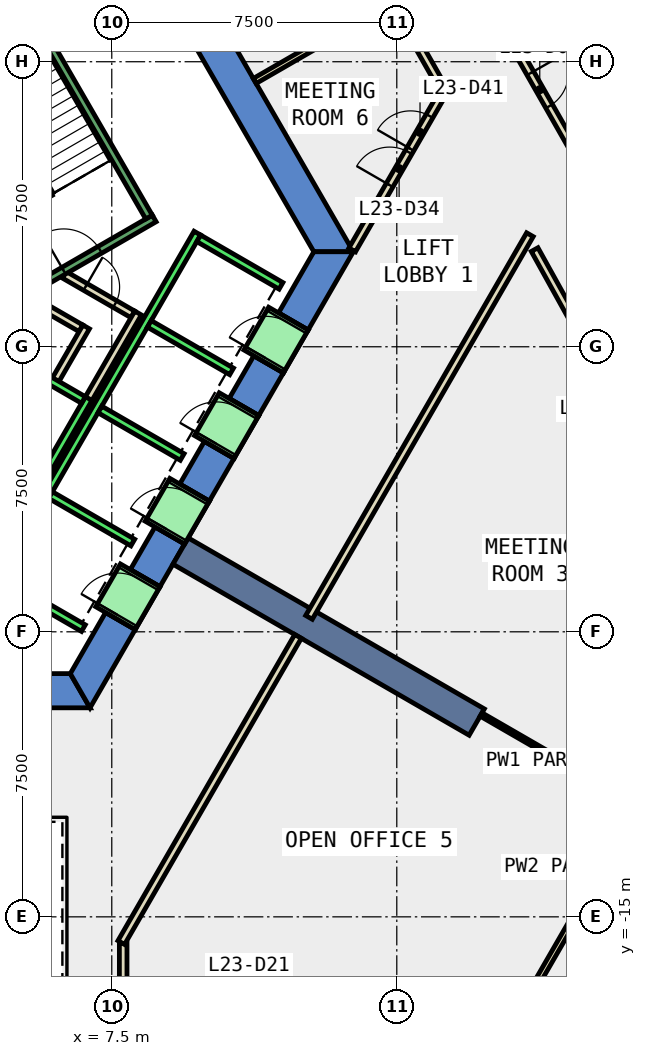
"""IFC4 building model, lengths in metres.
Left out: names, types, materials, properties, quantities, classifications, styles, units other than length and angle.
Written with IfcOpenShell. Run it as: python <this file> out.ifc"""

import sys

from ifc_helpers import new_model, si_unit, direction, frame, frame_2d, origin, place, context, subcontext, project, spatial, polyline, rectangle, outline, extrude, element, fill, save


model = new_model("IFC4")
c1 = context("Model", 3, precision=1e-05, world=origin(), true_north=direction((0.0, 1.0)))
c2 = subcontext(c1, "Body", "Model", "MODEL_VIEW")
j1 = project(units=[si_unit("LENGTHUNIT", "METRE"), si_unit("PLANEANGLEUNIT", "RADIAN")], contexts=[c1])
p1 = place(None, origin())
s1 = spatial("IfcSite", under=j1, at=p1, CompositionType="ELEMENT")
p2 = place(p1, origin())
s2 = spatial("IfcBuilding", under=s1, at=p2, CompositionType="ELEMENT")
p3 = place(p2, frame((0.0, 0.0, 107.6)))
s3 = spatial("IfcBuildingStorey", under=s2, at=p3, CompositionType="ELEMENT", Elevation=107.6)
p4 = place(p3, frame((0.0, 0.0, -0.4)))
e1 = element("IfcWall", 1, at=p4, inside=s3, PredefinedType="SHEAR", context=c2, shape_type="SweptSolid", body=[
    extrude(outline(polyline([(8.517, 11.748), (7.738, 11.298), (12.817, 2.5), (13.856, 2.5), (8.517, 11.748)])), origin(), (0.0, 0.0, 1.0), 4.2),
])
p5 = place(p3, frame((0.0, 0.0, -0.4)))
e2 = element("IfcWall", 2, at=p5, inside=s3, PredefinedType="SHEAR", context=c2, shape_type="SweptSolid", body=[
    extrude(outline(polyline([(5.75, -8.6), (5.75, -9.5), (6.928, -9.5), (6.409, -8.6), (5.75, -8.6)])), origin(), (0.0, 0.0, 1.0), 4.2),
])
p6 = place(p3, frame((0.0, 0.0, -0.4)))
e3 = element("IfcWall", 3, at=p6, inside=s3, PredefinedType="SHEAR", context=c2, shape_type="SweptSolid", body=[
    extrude(outline(polyline([(8.117, -7.44), (7.338, -6.99), (6.409, -8.6), (6.928, -9.5), (8.117, -7.44)])), origin(), (0.0, 0.0, 1.0), 4.2),
])
p7 = place(p3, frame((0.0, 0.0, -0.4)))
e4 = element("IfcWall", 4, at=p7, inside=s3, PredefinedType="SHEAR", context=c2, shape_type="SweptSolid", body=[
    extrude(outline(polyline([(9.417, -5.189), (8.638, -4.739), (7.988, -5.864), (8.767, -6.314), (9.417, -5.189)])), origin(), (0.0, 0.0, 1.0), 4.2),
])
p8 = place(p3, frame((0.0, 0.0, -0.4)))
e5 = element("IfcWall", 5, at=p8, inside=s3, PredefinedType="SHEAR", context=c2, shape_type="SweptSolid", body=[
    extrude(outline(polyline([(10.717, -2.937), (9.938, -2.487), (9.288, -3.613), (10.067, -4.063), (10.717, -2.937)])), origin(), (0.0, 0.0, 1.0), 4.2),
])
p9 = place(p3, frame((0.0, 0.0, -0.4)))
e6 = element("IfcWall", 6, at=p9, inside=s3, PredefinedType="SHEAR", context=c2, shape_type="SweptSolid", body=[
    extrude(outline(polyline([(12.017, -0.686), (11.238, -0.236), (10.588, -1.361), (11.367, -1.811), (12.017, -0.686)])), origin(), (0.0, 0.0, 1.0), 4.2),
])
p10 = place(p3, frame((0.0, 0.0, -0.4)))
e7 = element("IfcWall", 7, at=p10, inside=s3, PredefinedType="SHEAR", context=c2, shape_type="SweptSolid", body=[
    extrude(outline(polyline([(11.888, 0.89), (12.667, 0.44), (13.856, 2.5), (12.817, 2.5), (11.888, 0.89)])), origin(), (0.0, 0.0, 1.0), 4.2),
])
p11 = place(p3, frame((0.0, 0.0, 3.6)))
e8 = element("IfcWall", 8, at=p11, inside=s3, PredefinedType="SHEAR", context=c2, shape_type="SweptSolid", body=[
    extrude(outline(polyline([(8.767, -6.314), (7.988, -5.864), (7.338, -6.99), (8.117, -7.44), (8.767, -6.314)])), origin(), (0.0, 0.0, 1.0), 0.2),
])
p12 = place(p3, frame((0.0, 0.0, 3.6)))
e9 = element("IfcWall", 9, at=p12, inside=s3, PredefinedType="SHEAR", context=c2, shape_type="SweptSolid", body=[
    extrude(outline(polyline([(10.067, -4.063), (9.288, -3.613), (8.638, -4.739), (9.417, -5.189), (10.067, -4.063)])), origin(), (0.0, 0.0, 1.0), 0.2),
])
p13 = place(p3, frame((0.0, 0.0, 3.6)))
e10 = element("IfcWall", 10, at=p13, inside=s3, PredefinedType="SHEAR", context=c2, shape_type="SweptSolid", body=[
    extrude(outline(polyline([(11.367, -1.811), (10.588, -1.361), (9.938, -2.487), (10.717, -2.937), (11.367, -1.811)])), origin(), (0.0, 0.0, 1.0), 0.2),
])
p14 = place(p3, frame((0.0, 0.0, 3.6)))
e11 = element("IfcWall", 11, at=p14, inside=s3, PredefinedType="SHEAR", context=c2, shape_type="SweptSolid", body=[
    extrude(outline(polyline([(12.667, 0.44), (11.888, 0.89), (11.238, -0.236), (12.017, -0.686), (12.667, 0.44)])), origin(), (0.0, 0.0, 1.0), 0.2),
])
p15 = place(p3, frame((9.31, -5.375, -0.4), z_axis=(0.0, 0.0, 1.0), x_axis=(0.866017533419, -0.500013631625, 0.0)))
e12 = element("IfcWall", 12, at=p15, inside=s3, PredefinedType="SHEAR", context=c2, shape_type="SweptSolid", body=[
    extrude(rectangle(XDim=9.0, YDim=0.8, at=frame_2d((4.5, 0.0))), origin(), (0.0, 0.0, 1.0), 4.2),
])
p16 = place(p3, frame((16.195, 6.824, 0.0), z_axis=(0.0, 0.0, 1.0), x_axis=(-0.494984897559, 0.868901577388, 0.0)))
e13 = element("IfcWall", 13, at=p16, inside=s3, PredefinedType="PARTITIONING", context=c2, shape_type="SweptSolid", body=[
    extrude(rectangle(XDim=2.188, YDim=0.2, at=frame_2d((1.094, 0.0))), origin(), (0.0, 0.0, 1.0), 3.8),
])
p17 = place(p3, frame((22.071, -3.65, 0.0), z_axis=(0.0, 0.0, 1.0), x_axis=(-0.485198988697, 0.874403763354, 0.0)))
e14 = element("IfcWall", 14, at=p17, inside=s3, PredefinedType="PARTITIONING", context=c2, shape_type="SweptSolid", body=[
    extrude(rectangle(XDim=7.098, YDim=0.2, at=frame_2d((3.549, 0.0))), origin(), (0.0, 0.0, 1.0), 3.8),
])
p18 = place(p17, frame((3.049, 0.0, 0.0)))
e15 = element("IfcOpeningElement", 15, at=p18, cuts=e14, PredefinedType="OPENING", context=c2, shape_type="SweptSolid", body=[
    extrude(rectangle(XDim=1.0, YDim=2.1, at=frame_2d((0.5, 1.05))), frame((0.0, 0.11, 0.0), z_axis=(0.0, -1.0, 0.0), x_axis=(1.0, 0.0, 0.0)), (0.0, 0.0, 1.0), 0.22),
])
p19 = place(p3, frame((16.98, 9.89, 0.0), z_axis=(0.0, 0.0, 1.0), x_axis=(0.495123170501, -0.868822793228, 0.0)))
e16 = element("IfcWall", 16, at=p19, inside=s3, PredefinedType="PARTITIONING", context=c2, shape_type="SweptSolid", body=[
    extrude(rectangle(XDim=7.198, YDim=0.2, at=frame_2d((3.599, 0.0))), origin(), (0.0, 0.0, 1.0), 3.8),
])
p20 = place(p19, frame((3.099, 0.0, 0.0)))
e17 = element("IfcOpeningElement", 17, at=p20, cuts=e16, PredefinedType="OPENING", context=c2, shape_type="SweptSolid", body=[
    extrude(rectangle(XDim=1.0, YDim=2.1, at=frame_2d((0.5, 1.05))), frame((0.0, 0.11, 0.0), z_axis=(0.0, -1.0, 0.0), x_axis=(1.0, 0.0, 0.0)), (0.0, 0.0, 1.0), 0.22),
])
p21 = place(p3, frame((5.499, 1.172, 0.0), z_axis=(0.0, 0.0, 1.0), x_axis=(0.866333505267, -0.499465972466, 0.0)))
e18 = element("IfcWall", 18, at=p21, inside=s3, PredefinedType="PARTITIONING", context=c2, shape_type="SweptSolid", body=[
    extrude(rectangle(XDim=1.374, YDim=0.2, at=frame_2d((0.687, 0.0))), origin(), (0.0, 0.0, 1.0), 3.8),
])
p22 = place(p3, frame((6.826, 0.522, 0.0), z_axis=(0.0, 0.0, 1.0), x_axis=(-0.500016722714, -0.866015748706, 0.0)))
e19 = element("IfcWall", 19, at=p22, inside=s3, PredefinedType="PARTITIONING", context=c2, shape_type="SweptSolid", body=[
    extrude(rectangle(XDim=1.7, YDim=0.2, at=frame_2d((0.85, 0.0))), origin(), (0.0, 0.0, 1.0), 3.8),
])
p23 = place(p3, frame((6.25, 1.894, 0.0), z_axis=(0.0, 0.0, 1.0), x_axis=(0.866043184279, -0.499969202016, 0.0)))
e20 = element("IfcWall", 20, at=p23, inside=s3, PredefinedType="PARTITIONING", context=c2, shape_type="SweptSolid", body=[
    extrude(rectangle(XDim=2.084, YDim=0.2, at=frame_2d((1.042, 0.0))), origin(), (0.0, 0.0, 1.0), 3.8),
])
p24 = place(p23, frame((0.642, 0.0, 0.0)))
e21 = element("IfcOpeningElement", 21, at=p24, cuts=e20, PredefinedType="OPENING", context=c2, shape_type="SweptSolid", body=[
    extrude(rectangle(XDim=0.9, YDim=2.1, at=frame_2d((0.45, 1.05))), frame((0.0, 0.11, 0.0), z_axis=(0.0, -1.0, 0.0), x_axis=(1.0, 0.0, 0.0)), (0.0, 0.0, 1.0), 0.22),
])
p25 = place(p3, frame((8.192, 0.888, 0.0), z_axis=(0.0, 0.0, 1.0), x_axis=(-0.499940625693, -0.866059680843, 0.0)))
e22 = element("IfcWall", 22, at=p25, inside=s3, PredefinedType="PARTITIONING", context=c2, shape_type="SweptSolid", body=[
    extrude(rectangle(XDim=2.68, YDim=0.2, at=frame_2d((1.34, 0.0))), origin(), (0.0, 0.0, 1.0), 3.8),
])
p26 = place(p3, frame((11.261, 6.994, 0.0), z_axis=(0.0, 0.0, 1.0), x_axis=(0.866037428454, 0.499979172084, 0.0)))
e23 = element("IfcWall", 23, at=p26, inside=s3, PredefinedType="PARTITIONING", context=c2, shape_type="SweptSolid", body=[
    extrude(rectangle(XDim=4.198, YDim=0.15, at=frame_2d((2.099, 0.0))), origin(), (0.0, 0.0, 1.0), 3.8),
])
p27 = place(p3, frame((13.827, 2.55, 0.0), z_axis=(0.0, 0.0, 1.0), x_axis=(0.500070719615, 0.865984569946, 0.0)))
e24 = element("IfcWall", 24, at=p27, inside=s3, PredefinedType="PARTITIONING", context=c2, shape_type="SweptSolid", body=[
    extrude(rectangle(XDim=4.935, YDim=0.2, at=frame_2d((2.468, 0.0))), origin(), (0.0, 0.0, 1.0), 3.8),
])
p28 = place(p27, frame((1.968, 0.0, 0.0)))
e25 = element("IfcOpeningElement", 25, at=p28, cuts=e24, PredefinedType="OPENING", context=c2, shape_type="SweptSolid", body=[
    extrude(rectangle(XDim=1.0, YDim=2.1, at=frame_2d((0.5, 1.05))), frame((0.0, 0.11, 0.0), z_axis=(0.0, -1.0, 0.0), x_axis=(1.0, 0.0, 0.0)), (0.0, 0.0, 1.0), 0.22),
])
p29 = place(p27, frame((3.068, 0.0, 0.0)))
e26 = element("IfcOpeningElement", 26, at=p29, cuts=e24, PredefinedType="OPENING", context=c2, shape_type="SweptSolid", body=[
    extrude(rectangle(XDim=1.0, YDim=2.1, at=frame_2d((0.5, 1.05))), frame((0.0, 0.11, 0.0), z_axis=(0.0, -1.0, 0.0), x_axis=(1.0, 0.0, 0.0)), (0.0, 0.0, 1.0), 0.22),
])
p30 = place(p3, frame((7.8, -15.69, 0.0), z_axis=(0.0, 0.0, 1.0), x_axis=(0.0, -1.0, 0.0)))
e27 = element("IfcWall", 27, at=p30, inside=s3, PredefinedType="PARTITIONING", context=c2, shape_type="SweptSolid", body=[
    extrude(rectangle(XDim=1.7, YDim=0.2, at=frame_2d((0.85, 0.0))), origin(), (0.0, 0.0, 1.0), 3.8),
])
p31 = place(p3, frame((12.401, -7.621, 0.0), z_axis=(0.0, 0.0, 1.0), x_axis=(-0.499983724212, -0.866034800411, 0.0)))
e28 = element("IfcWall", 28, at=p31, inside=s3, PredefinedType="PARTITIONING", context=c2, shape_type="SweptSolid", body=[
    extrude(rectangle(XDim=9.302, YDim=0.2, at=frame_2d((4.651, 0.0))), origin(), (0.0, 0.0, 1.0), 3.8),
])
p32 = place(p3, frame((18.503, 2.949, 0.0), z_axis=(0.0, 0.0, 1.0), x_axis=(-0.49997390151, -0.86604047123, 0.0)))
e29 = element("IfcWall", 29, at=p32, inside=s3, PredefinedType="PARTITIONING", context=c2, shape_type="SweptSolid", body=[
    extrude(rectangle(XDim=11.626, YDim=0.2, at=frame_2d((5.813, 0.0))), origin(), (0.0, 0.0, 1.0), 3.8),
])
p33 = place(p3, frame((17.219, -9.676, 0.0), z_axis=(0.0, 0.0, 1.0), x_axis=(0.86598459596, -0.500070674565, 0.0)))
e30 = element("IfcWall", 30, at=p33, inside=s3, PredefinedType="PARTITIONING", context=c2, shape_type="SweptSolid", body=[
    extrude(rectangle(XDim=4.875, YDim=0.1, at=frame_2d((2.438, 0.0))), origin(), (0.0, 0.0, 1.0), 3.8),
])
p34 = place(p3, frame((21.236, -12.319, 0.0), z_axis=(0.0, 0.0, 1.0), x_axis=(-0.500016488359, -0.866015884017, 0.0)))
e31 = element("IfcWall", 31, at=p34, inside=s3, PredefinedType="PARTITIONING", context=c2, shape_type="SweptSolid", body=[
    extrude(rectangle(XDim=5.702, YDim=0.15, at=frame_2d((2.851, 0.0))), origin(), (0.0, 0.0, 1.0), 3.8),
])
p35 = place(p3, frame((5.492, -3.788, 0.0), z_axis=(0.0, 0.0, 1.0), x_axis=(0.500011755427, 0.866018616679, 0.0)))
e32 = element("IfcWall", 32, at=p35, inside=s3, PredefinedType="STANDARD", context=c2, shape_type="SweptSolid", body=[
    extrude(rectangle(XDim=2.8, YDim=0.2, at=frame_2d((1.4, 0.0))), origin(), (0.0, 0.0, 1.0), 3.8),
])
p36 = place(p3, frame((4.677, -0.2, 0.0), z_axis=(0.0, 0.0, 1.0), x_axis=(0.865973769406, -0.500089422704, 0.0)))
e33 = element("IfcWall", 33, at=p36, inside=s3, PredefinedType="STANDARD", context=c2, shape_type="SweptSolid", body=[
    extrude(rectangle(XDim=2.399, YDim=0.2, at=frame_2d((1.2, 0.0))), origin(), (0.0, 0.0, 1.0), 3.8),
])
p37 = place(p3, frame((4.451, -6.19, 0.0), z_axis=(0.0, 0.0, 1.0), x_axis=(0.50000090737, 0.866024879913, 0.0)))
e34 = element("IfcWall", 34, at=p37, inside=s3, PredefinedType="STANDARD", context=c2, shape_type="SweptSolid", body=[
    extrude(rectangle(XDim=10.6, YDim=0.2, at=frame_2d((5.3, 0.0))), origin(), (0.0, 0.0, 1.0), 3.8),
])
for number, where, z_axis, x_axis in (
    (35, (4.588, -6.153, 0.0), (0.0, 0.0, 1.0), (0.866, -0.5, 0.0)),
    (36, (5.888, -3.902, 0.0), (0.0, 0.0, 1.0), (0.866, -0.5, 0.0)),
    (37, (7.188, -1.65, 0.0), (0.0, 0.0, 1.0), (0.866, -0.5, 0.0)),
    (38, (8.488, 0.602, 0.0), (0.0, 0.0, 1.0), (0.866, -0.5, 0.0)),
):
    element("IfcWall", number, at=place(p3, frame(where, z_axis=z_axis, x_axis=x_axis)), inside=s3, PredefinedType="STANDARD", context=c2, shape_type="SweptSolid", body=[
        extrude(rectangle(XDim=2.5, YDim=0.2, at=frame_2d((1.25, 0.0))), origin(), (0.0, 0.0, 1.0), 3.8),
    ])
p38 = place(p3, frame((9.788, 2.853, 0.0), z_axis=(0.0, 0.0, 1.0), x_axis=(0.865998541277, -0.500046524342, 0.0)))
e39 = element("IfcWall", 39, at=p38, inside=s3, PredefinedType="STANDARD", context=c2, shape_type="SweptSolid", body=[
    extrude(rectangle(XDim=2.5, YDim=0.2, at=frame_2d((1.25, 0.0))), origin(), (0.0, 0.0, 1.0), 3.8),
])
p39 = place(p3, frame((7.598, -7.14, 0.0), z_axis=(0.0, 0.0, 1.0), x_axis=(0.500362116554, 0.865816234728, 0.0)))
e40 = element("IfcWall", 40, at=p39, inside=s3, PredefinedType="STANDARD", context=c2, shape_type="SweptSolid", body=[
    extrude(rectangle(XDim=1.299, YDim=1.2, at=frame_2d((0.65, 0.0))), origin(), (0.0, 0.0, 1.0), 2.4),
])
p40 = place(p39, frame((0.1, 0.0, 0.0)))
e41 = element("IfcOpeningElement", 41, at=p40, cuts=e40, PredefinedType="OPENING", context=c2, shape_type="SweptSolid", body=[
    extrude(rectangle(XDim=1.1, YDim=2.3, at=frame_2d((0.55, 1.15))), frame((0.0, 0.61, 0.0), z_axis=(0.0, -1.0, 0.0), x_axis=(1.0, 0.0, 0.0)), (0.0, 0.0, 1.0), 1.22),
])
p41 = place(p3, frame((8.898, -4.889, 0.0), z_axis=(0.0, 0.0, 1.0), x_axis=(0.500036693733, 0.866004217611, 0.0)))
e42 = element("IfcWall", 42, at=p41, inside=s3, PredefinedType="STANDARD", context=c2, shape_type="SweptSolid", body=[
    extrude(rectangle(XDim=1.3, YDim=1.2, at=frame_2d((0.65, 0.0))), origin(), (0.0, 0.0, 1.0), 2.4),
])
p42 = place(p41, frame((0.1, 0.0, 0.0)))
e43 = element("IfcOpeningElement", 43, at=p42, cuts=e42, PredefinedType="OPENING", context=c2, shape_type="SweptSolid", body=[
    extrude(rectangle(XDim=1.1, YDim=2.3, at=frame_2d((0.55, 1.15))), frame((0.0, 0.61, 0.0), z_axis=(0.0, -1.0, 0.0), x_axis=(1.0, 0.0, 0.0)), (0.0, 0.0, 1.0), 1.22),
])
p43 = place(p3, frame((10.198, -2.637, 0.0), z_axis=(0.0, 0.0, 1.0), x_axis=(0.49989585183, 0.866085525409, 0.0)))
e44 = element("IfcWall", 44, at=p43, inside=s3, PredefinedType="STANDARD", context=c2, shape_type="SweptSolid", body=[
    extrude(rectangle(XDim=1.3, YDim=1.2, at=frame_2d((0.65, 0.0))), origin(), (0.0, 0.0, 1.0), 2.4),
])
p44 = place(p43, frame((0.1, 0.0, 0.0)))
e45 = element("IfcOpeningElement", 45, at=p44, cuts=e44, PredefinedType="OPENING", context=c2, shape_type="SweptSolid", body=[
    extrude(rectangle(XDim=1.1, YDim=2.3, at=frame_2d((0.55, 1.15))), frame((0.0, 0.61, 0.0), z_axis=(0.0, -1.0, 0.0), x_axis=(1.0, 0.0, 0.0)), (0.0, 0.0, 1.0), 1.22),
])
p45 = place(p3, frame((11.498, -0.385, 0.0), z_axis=(0.0, 0.0, 1.0), x_axis=(0.500221244143, 0.865897630733, 0.0)))
e46 = element("IfcWall", 46, at=p45, inside=s3, PredefinedType="STANDARD", context=c2, shape_type="SweptSolid", body=[
    extrude(rectangle(XDim=1.299, YDim=1.2, at=frame_2d((0.65, 0.0))), origin(), (0.0, 0.0, 1.0), 2.4),
])
p46 = place(p45, frame((0.1, 0.0, 0.0)))
e47 = element("IfcOpeningElement", 47, at=p46, cuts=e46, PredefinedType="OPENING", context=c2, shape_type="SweptSolid", body=[
    extrude(rectangle(XDim=1.1, YDim=2.3, at=frame_2d((0.55, 1.15))), frame((0.0, 0.61, 0.0), z_axis=(0.0, -1.0, 0.0), x_axis=(1.0, 0.0, 0.0)), (0.0, 0.0, 1.0), 1.22),
])
p47 = place(p3, frame((4.806, 1.176, 0.0), z_axis=(0.0, 0.0, 1.0), x_axis=(0.866059941101, 0.499940174841, 0.0)))
e48 = element("IfcWall", 48, at=p47, inside=s3, PredefinedType="STANDARD", context=c2, shape_type="SweptSolid", body=[
    extrude(rectangle(XDim=4.4, YDim=0.2, at=frame_2d((2.2, 0.0))), origin(), (0.0, 0.0, 1.0), 3.8),
])
p48 = place(p47, frame((1.65, 0.0, 0.0)))
e49 = element("IfcOpeningElement", 49, at=p48, cuts=e48, PredefinedType="OPENING", context=c2, shape_type="SweptSolid", body=[
    extrude(rectangle(XDim=1.1, YDim=2.2, at=frame_2d((0.55, 1.1))), frame((0.0, 0.11, 0.0), z_axis=(0.0, -1.0, 0.0), x_axis=(1.0, 0.0, 0.0)), (0.0, 0.0, 1.0), 0.22),
])
p49 = place(p3, frame((8.48, 3.412, 0.0), z_axis=(0.0, 0.0, 1.0), x_axis=(-0.499978703459, 0.866037698999, 0.0)))
e50 = element("IfcWall", 50, at=p49, inside=s3, PredefinedType="STANDARD", context=c2, shape_type="SweptSolid", body=[
    extrude(rectangle(XDim=6.9, YDim=0.2, at=frame_2d((3.45, 0.0))), origin(), (0.0, 0.0, 1.0), 3.8),
])
p50 = place(p20, origin())
e51 = element("IfcDoor", 51, at=p50, inside=s3, OperationType="SINGLE_SWING_LEFT", PredefinedType="DOOR", context=c2, shape_type="SweptSolid", body=[
    extrude(rectangle(XDim=1.0, YDim=2.1, at=frame_2d((0.5, 1.05))), frame((0.0, 0.025, 0.0), z_axis=(0.0, -1.0, 0.0), x_axis=(1.0, 0.0, 0.0)), (0.0, 0.0, 1.0), 0.05),
])
fill(e17, e51)
p51 = place(p28, origin())
e52 = element("IfcDoor", 52, at=p51, inside=s3, OperationType="SINGLE_SWING_LEFT", PredefinedType="DOOR", context=c2, shape_type="SweptSolid", body=[
    extrude(rectangle(XDim=1.0, YDim=2.1, at=frame_2d((0.5, 1.05))), frame((0.0, 0.025, 0.0), z_axis=(0.0, -1.0, 0.0), x_axis=(1.0, 0.0, 0.0)), (0.0, 0.0, 1.0), 0.05),
])
fill(e25, e52)
p52 = place(p24, origin())
e53 = element("IfcDoor", 53, at=p52, inside=s3, OperationType="SINGLE_SWING_LEFT", PredefinedType="DOOR", context=c2, shape_type="SweptSolid", body=[
    extrude(rectangle(XDim=0.9, YDim=2.1, at=frame_2d((0.45, 1.05))), frame((0.0, 0.025, 0.0), z_axis=(0.0, -1.0, 0.0), x_axis=(1.0, 0.0, 0.0)), (0.0, 0.0, 1.0), 0.05),
])
fill(e21, e53)
p53 = place(p29, origin())
e54 = element("IfcDoor", 54, at=p53, inside=s3, OperationType="SINGLE_SWING_RIGHT", PredefinedType="DOOR", context=c2, shape_type="SweptSolid", body=[
    extrude(rectangle(XDim=1.0, YDim=2.1, at=frame_2d((0.5, 1.05))), frame((0.0, 0.025, 0.0), z_axis=(0.0, -1.0, 0.0), x_axis=(1.0, 0.0, 0.0)), (0.0, 0.0, 1.0), 0.05),
])
fill(e26, e54)
p54 = place(p40, origin())
e55 = element("IfcDoor", 55, at=p54, inside=s3, OperationType="SLIDING_TO_LEFT", PredefinedType="DOOR", context=c2, shape_type="SweptSolid", body=[
    extrude(rectangle(XDim=1.1, YDim=2.3, at=frame_2d((0.55, 1.15))), frame((0.0, 0.025, 0.0), z_axis=(0.0, -1.0, 0.0), x_axis=(1.0, 0.0, 0.0)), (0.0, 0.0, 1.0), 0.05),
])
fill(e41, e55)
p55 = place(p42, origin())
e56 = element("IfcDoor", 56, at=p55, inside=s3, OperationType="SLIDING_TO_LEFT", PredefinedType="DOOR", context=c2, shape_type="SweptSolid", body=[
    extrude(rectangle(XDim=1.1, YDim=2.3, at=frame_2d((0.55, 1.15))), frame((0.0, 0.025, 0.0), z_axis=(0.0, -1.0, 0.0), x_axis=(1.0, 0.0, 0.0)), (0.0, 0.0, 1.0), 0.05),
])
fill(e43, e56)
p56 = place(p44, origin())
e57 = element("IfcDoor", 57, at=p56, inside=s3, OperationType="SLIDING_TO_LEFT", PredefinedType="DOOR", context=c2, shape_type="SweptSolid", body=[
    extrude(rectangle(XDim=1.1, YDim=2.3, at=frame_2d((0.55, 1.15))), frame((0.0, 0.025, 0.0), z_axis=(0.0, -1.0, 0.0), x_axis=(1.0, 0.0, 0.0)), (0.0, 0.0, 1.0), 0.05),
])
fill(e45, e57)
p57 = place(p46, origin())
e58 = element("IfcDoor", 58, at=p57, inside=s3, OperationType="SLIDING_TO_LEFT", PredefinedType="DOOR", context=c2, shape_type="SweptSolid", body=[
    extrude(rectangle(XDim=1.1, YDim=2.3, at=frame_2d((0.55, 1.15))), frame((0.0, 0.025, 0.0), z_axis=(0.0, -1.0, 0.0), x_axis=(1.0, 0.0, 0.0)), (0.0, 0.0, 1.0), 0.05),
])
fill(e47, e58)
p58 = place(p48, origin())
e59 = element("IfcDoor", 59, at=p58, inside=s3, OperationType="SINGLE_SWING_LEFT", PredefinedType="DOOR", context=c2, shape_type="SweptSolid", body=[
    extrude(rectangle(XDim=1.1, YDim=2.2, at=frame_2d((0.55, 1.1))), frame((0.0, 0.025, 0.0), z_axis=(0.0, -1.0, 0.0), x_axis=(1.0, 0.0, 0.0)), (0.0, 0.0, 1.0), 0.05),
])
fill(e49, e59)
save(model, sys.argv[1])
